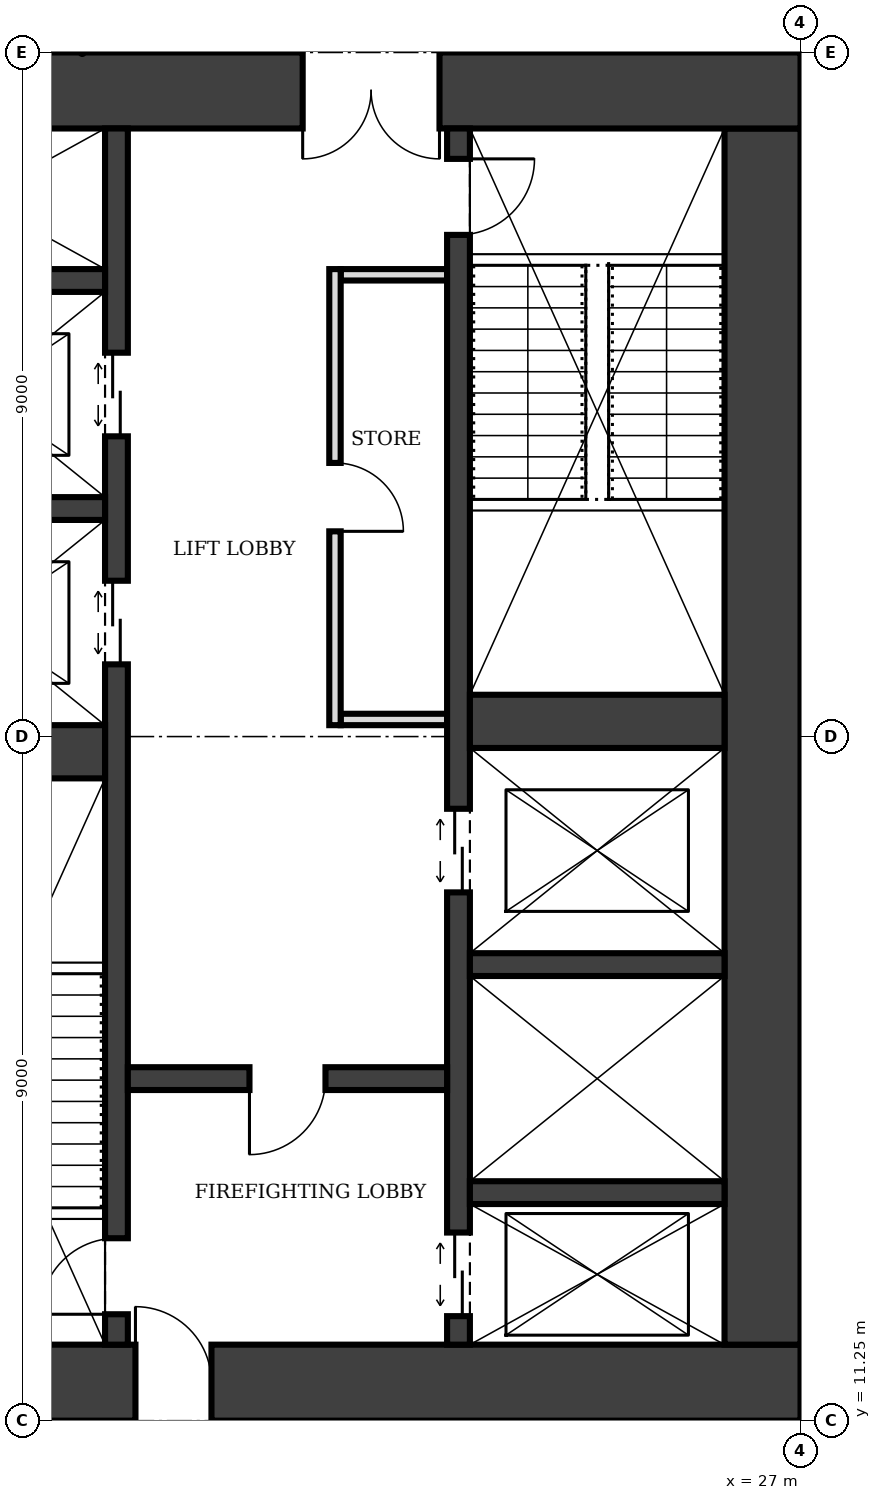
"""IFC4 building model, lengths in metres.
Left out: names, types, materials, properties, quantities, classifications, styles, units other than length and angle.
Written with IfcOpenShell. Run it as: python <this file> out.ifc"""

import sys

from ifc_helpers import new_model, si_unit, direction, frame, frame_2d, origin, place, context, subcontext, project, spatial, rectangle, extrude, element, fill, save


model = new_model("IFC4")
c1 = context("Model", 3, precision=1e-05, world=origin(), true_north=direction((0.0, 1.0)))
c2 = subcontext(c1, "Body", "Model", "MODEL_VIEW")
j1 = project(units=[si_unit("LENGTHUNIT", "METRE"), si_unit("PLANEANGLEUNIT", "RADIAN")], contexts=[c1])
p1 = place(None, origin())
s1 = spatial("IfcSite", under=j1, at=p1, CompositionType="ELEMENT")
p2 = place(p1, origin())
s2 = spatial("IfcBuilding", under=s1, at=p2, CompositionType="ELEMENT")
p3 = place(p2, frame((0.0, 0.0, 25.0)))
s3 = spatial("IfcBuildingStorey", under=s2, at=p3, CompositionType="ELEMENT", Elevation=25.0)
p4 = place(p3, frame((13.5, 11.75, 0.0), z_axis=(0.0, 0.0, 1.0), x_axis=(1.0, 0.0, 0.0)))
e1 = element("IfcWall", 1, at=p4, inside=s3, PredefinedType="SHEAR", context=c2, shape_type="SweptSolid", body=[
    extrude(rectangle(XDim=13.5, YDim=1.0, at=frame_2d((6.75, 0.0))), origin(), (0.0, 0.0, 1.0), 4.0),
])
p5 = place(p4, frame((4.75, 0.0, 0.0)))
e2 = element("IfcOpeningElement", 2, at=p5, cuts=e1, PredefinedType="OPENING", context=c2, shape_type="SweptSolid", body=[
    extrude(rectangle(XDim=1.0, YDim=2.1, at=frame_2d((0.5, 1.05))), frame((0.0, 0.51, 0.0), z_axis=(0.0, -1.0, 0.0), x_axis=(1.0, 0.0, 0.0)), (0.0, 0.0, 1.0), 1.02),
])
p6 = place(p3, frame((26.5, 12.25, 0.0), z_axis=(0.0, 0.0, 1.0), x_axis=(0.0, 1.0, 0.0)))
e3 = element("IfcWall", 3, at=p6, inside=s3, PredefinedType="SHEAR", context=c2, shape_type="SweptSolid", body=[
    extrude(rectangle(XDim=16.0, YDim=1.0, at=frame_2d((8.0, 0.0))), origin(), (0.0, 0.0, 1.0), 4.0),
])
p7 = place(p3, frame((27.0, 28.75, 0.0), z_axis=(0.0, 0.0, 1.0), x_axis=(-1.0, 0.0, 0.0)))
e4 = element("IfcWall", 4, at=p7, inside=s3, PredefinedType="SHEAR", context=c2, shape_type="SweptSolid", body=[
    extrude(rectangle(XDim=13.5, YDim=1.0, at=frame_2d((6.75, 0.0))), origin(), (0.0, 0.0, 1.0), 4.0),
])
p8 = place(p7, frame((4.75, 0.0, 0.0)))
e5 = element("IfcOpeningElement", 5, at=p8, cuts=e4, PredefinedType="OPENING", context=c2, shape_type="SweptSolid", body=[
    extrude(rectangle(XDim=1.8, YDim=2.1, at=frame_2d((0.9, 1.05))), frame((0.0, 0.51, 0.0), z_axis=(0.0, -1.0, 0.0), x_axis=(1.0, 0.0, 0.0)), (0.0, 0.0, 1.0), 1.02),
])
p9 = place(p3, frame((18.0, 12.25, 0.0), z_axis=(0.0, 0.0, 1.0), x_axis=(0.0, 1.0, 0.0)))
e6 = element("IfcWall", 6, at=p9, inside=s3, PredefinedType="SHEAR", context=c2, shape_type="SweptSolid", body=[
    extrude(rectangle(XDim=16.0, YDim=0.3, at=frame_2d((8.0, 0.0))), origin(), (0.0, 0.0, 1.0), 4.0),
])
p10 = place(p9, frame((0.4, 0.0, 0.0)))
e7 = element("IfcOpeningElement", 7, at=p10, cuts=e6, PredefinedType="OPENING", context=c2, shape_type="SweptSolid", body=[
    extrude(rectangle(XDim=1.0, YDim=2.1, at=frame_2d((0.5, 1.05))), frame((0.0, 0.16, 0.0), z_axis=(0.0, -1.0, 0.0), x_axis=(1.0, 0.0, 0.0)), (0.0, 0.0, 1.0), 0.32),
])
p11 = place(p9, frame((8.95, 0.0, 0.0)))
e8 = element("IfcOpeningElement", 8, at=p11, cuts=e6, PredefinedType="OPENING", context=c2, shape_type="SweptSolid", body=[
    extrude(rectangle(XDim=1.1, YDim=2.1, at=frame_2d((0.55, 1.05))), frame((0.0, 0.16, 0.0), z_axis=(0.0, -1.0, 0.0), x_axis=(1.0, 0.0, 0.0)), (0.0, 0.0, 1.0), 0.32),
])
p12 = place(p9, frame((11.95, 0.0, 0.0)))
e9 = element("IfcOpeningElement", 9, at=p12, cuts=e6, PredefinedType="OPENING", context=c2, shape_type="SweptSolid", body=[
    extrude(rectangle(XDim=1.1, YDim=2.1, at=frame_2d((0.55, 1.05))), frame((0.0, 0.16, 0.0), z_axis=(0.0, -1.0, 0.0), x_axis=(1.0, 0.0, 0.0)), (0.0, 0.0, 1.0), 0.32),
])
p13 = place(p3, frame((22.5, 12.25, 0.0), z_axis=(0.0, 0.0, 1.0), x_axis=(0.0, 1.0, 0.0)))
e10 = element("IfcWall", 10, at=p13, inside=s3, PredefinedType="SHEAR", context=c2, shape_type="SweptSolid", body=[
    extrude(rectangle(XDim=16.0, YDim=0.3, at=frame_2d((8.0, 0.0))), origin(), (0.0, 0.0, 1.0), 4.0),
])
p14 = place(p13, frame((14.6, 0.0, 0.0)))
e11 = element("IfcOpeningElement", 11, at=p14, cuts=e10, PredefinedType="OPENING", context=c2, shape_type="SweptSolid", body=[
    extrude(rectangle(XDim=1.0, YDim=2.1, at=frame_2d((0.5, 1.05))), frame((0.0, 0.16, 0.0), z_axis=(0.0, -1.0, 0.0), x_axis=(1.0, 0.0, 0.0)), (0.0, 0.0, 1.0), 0.32),
])
p15 = place(p13, frame((0.375, 0.0, 0.0)))
e12 = element("IfcOpeningElement", 12, at=p15, cuts=e10, PredefinedType="OPENING", context=c2, shape_type="SweptSolid", body=[
    extrude(rectangle(XDim=1.1, YDim=2.1, at=frame_2d((0.55, 1.05))), frame((0.0, 0.16, 0.0), z_axis=(0.0, -1.0, 0.0), x_axis=(1.0, 0.0, 0.0)), (0.0, 0.0, 1.0), 0.32),
])
p16 = place(p13, frame((5.95, 0.0, 0.0)))
e13 = element("IfcOpeningElement", 13, at=p16, cuts=e10, PredefinedType="OPENING", context=c2, shape_type="SweptSolid", body=[
    extrude(rectangle(XDim=1.1, YDim=2.1, at=frame_2d((0.55, 1.05))), frame((0.0, 0.16, 0.0), z_axis=(0.0, -1.0, 0.0), x_axis=(1.0, 0.0, 0.0)), (0.0, 0.0, 1.0), 0.32),
])
p17 = place(p3, frame((14.5, 20.05, 0.0), z_axis=(0.0, 0.0, 1.0), x_axis=(1.0, 0.0, 0.0)))
e14 = element("IfcWall", 14, at=p17, inside=s3, PredefinedType="SHEAR", context=c2, shape_type="SweptSolid", body=[
    extrude(rectangle(XDim=3.35, YDim=0.7, at=frame_2d((1.675, 0.0))), origin(), (0.0, 0.0, 1.0), 4.0),
])
p18 = place(p3, frame((18.15, 15.75, 0.0), z_axis=(0.0, 0.0, 1.0), x_axis=(1.0, 0.0, 0.0)))
e15 = element("IfcWall", 15, at=p18, inside=s3, PredefinedType="SHEAR", context=c2, shape_type="SweptSolid", body=[
    extrude(rectangle(XDim=4.2, YDim=0.3, at=frame_2d((2.1, 0.0))), origin(), (0.0, 0.0, 1.0), 4.0),
])
p19 = place(p18, frame((1.6, 0.0, 0.0)))
e16 = element("IfcOpeningElement", 16, at=p19, cuts=e15, PredefinedType="OPENING", context=c2, shape_type="SweptSolid", body=[
    extrude(rectangle(XDim=1.0, YDim=2.1, at=frame_2d((0.5, 1.05))), frame((0.0, 0.16, 0.0), z_axis=(0.0, -1.0, 0.0), x_axis=(1.0, 0.0, 0.0)), (0.0, 0.0, 1.0), 0.32),
])
for number, where, z_axis, x_axis in (
    (17, (22.65, 14.25, 0.0), (0.0, 0.0, 1.0), (1.0, 0.0, 0.0)),
    (18, (22.65, 17.25, 0.0), (0.0, 0.0, 1.0), (1.0, 0.0, 0.0)),
):
    element("IfcWall", number, at=place(p3, frame(where, z_axis=z_axis, x_axis=x_axis)), inside=s3, PredefinedType="SHEAR", context=c2, shape_type="SweptSolid", body=[
        extrude(rectangle(XDim=3.35, YDim=0.3, at=frame_2d((1.675, 0.0))), origin(), (0.0, 0.0, 1.0), 4.0),
    ])
p20 = place(p3, frame((22.65, 20.45, 0.0), z_axis=(0.0, 0.0, 1.0), x_axis=(1.0, 0.0, 0.0)))
e19 = element("IfcWall", 19, at=p20, inside=s3, PredefinedType="SHEAR", context=c2, shape_type="SweptSolid", body=[
    extrude(rectangle(XDim=3.35, YDim=0.7, at=frame_2d((1.675, 0.0))), origin(), (0.0, 0.0, 1.0), 4.0),
])
for number, where, z_axis, x_axis in (
    (20, (14.5, 23.25, 0.0), (0.0, 0.0, 1.0), (1.0, 0.0, 0.0)),
    (21, (14.5, 26.25, 0.0), (0.0, 0.0, 1.0), (1.0, 0.0, 0.0)),
):
    element("IfcWall", number, at=place(p3, frame(where, z_axis=z_axis, x_axis=x_axis)), inside=s3, PredefinedType="SHEAR", context=c2, shape_type="SweptSolid", body=[
        extrude(rectangle(XDim=3.35, YDim=0.3, at=frame_2d((1.675, 0.0))), origin(), (0.0, 0.0, 1.0), 4.0),
    ])
p21 = place(p3, frame((20.875, 20.4, 0.0), z_axis=(0.0, 0.0, 1.0), x_axis=(0.0, 1.0, 0.0)))
e22 = element("IfcWall", 22, at=p21, inside=s3, PredefinedType="PARTITIONING", context=c2, shape_type="SweptSolid", body=[
    extrude(rectangle(XDim=6.0, YDim=0.15, at=frame_2d((3.0, 0.0))), origin(), (0.0, 0.0, 1.0), 3.75),
])
p22 = place(p21, frame((2.55, 0.0, 0.0)))
e23 = element("IfcOpeningElement", 23, at=p22, cuts=e22, PredefinedType="OPENING", context=c2, shape_type="SweptSolid", body=[
    extrude(rectangle(XDim=0.9, YDim=2.1, at=frame_2d((0.45, 1.05))), frame((0.0, 0.085, 0.0), z_axis=(0.0, -1.0, 0.0), x_axis=(1.0, 0.0, 0.0)), (0.0, 0.0, 1.0), 0.17),
])
for number, where, z_axis, x_axis in (
    (24, (20.95, 20.475, 0.0), (0.0, 0.0, 1.0), (1.0, 0.0, 0.0)),
    (25, (20.95, 26.325, 0.0), (0.0, 0.0, 1.0), (1.0, 0.0, 0.0)),
):
    element("IfcWall", number, at=place(p3, frame(where, z_axis=z_axis, x_axis=x_axis)), inside=s3, PredefinedType="PARTITIONING", context=c2, shape_type="SweptSolid", body=[
        extrude(rectangle(XDim=1.4, YDim=0.15, at=frame_2d((0.7, 0.0))), origin(), (0.0, 0.0, 1.0), 3.75),
    ])
p23 = place(p5, origin())
e26 = element("IfcDoor", 26, at=p23, inside=s3, OperationType="SINGLE_SWING_LEFT", PredefinedType="DOOR", context=c2, shape_type="SweptSolid", body=[
    extrude(rectangle(XDim=1.0, YDim=2.1, at=frame_2d((0.5, 1.05))), frame((0.0, 0.025, 0.0), z_axis=(0.0, -1.0, 0.0), x_axis=(1.0, 0.0, 0.0)), (0.0, 0.0, 1.0), 0.05),
])
fill(e2, e26)
p24 = place(p8, origin())
e27 = element("IfcDoor", 27, at=p24, inside=s3, OperationType="DOUBLE_DOOR_SINGLE_SWING", PredefinedType="DOOR", context=c2, shape_type="SweptSolid", body=[
    extrude(rectangle(XDim=1.8, YDim=2.1, at=frame_2d((0.9, 1.05))), frame((0.0, 0.025, 0.0), z_axis=(0.0, -1.0, 0.0), x_axis=(1.0, 0.0, 0.0)), (0.0, 0.0, 1.0), 0.05),
])
fill(e5, e27)
p25 = place(p19, frame((1.0, 0.0, 0.0), z_axis=(0.0, 0.0, 1.0), x_axis=(-1.0, 0.0, 0.0)))
e28 = element("IfcDoor", 28, at=p25, inside=s3, OperationType="SINGLE_SWING_RIGHT", PredefinedType="DOOR", context=c2, shape_type="SweptSolid", body=[
    extrude(rectangle(XDim=1.0, YDim=2.1, at=frame_2d((0.5, 1.05))), frame((0.0, 0.025, 0.0), z_axis=(0.0, -1.0, 0.0), x_axis=(1.0, 0.0, 0.0)), (0.0, 0.0, 1.0), 0.05),
])
fill(e16, e28)
p26 = place(p10, origin())
e29 = element("IfcDoor", 29, at=p26, inside=s3, OperationType="SINGLE_SWING_LEFT", PredefinedType="DOOR", context=c2, shape_type="SweptSolid", body=[
    extrude(rectangle(XDim=1.0, YDim=2.1, at=frame_2d((0.5, 1.05))), frame((0.0, 0.025, 0.0), z_axis=(0.0, -1.0, 0.0), x_axis=(1.0, 0.0, 0.0)), (0.0, 0.0, 1.0), 0.05),
])
fill(e7, e29)
p27 = place(p14, frame((1.0, 0.0, 0.0), z_axis=(0.0, 0.0, 1.0), x_axis=(-1.0, 0.0, 0.0)))
e30 = element("IfcDoor", 30, at=p27, inside=s3, OperationType="SINGLE_SWING_LEFT", PredefinedType="DOOR", context=c2, shape_type="SweptSolid", body=[
    extrude(rectangle(XDim=1.0, YDim=2.1, at=frame_2d((0.5, 1.05))), frame((0.0, 0.025, 0.0), z_axis=(0.0, -1.0, 0.0), x_axis=(1.0, 0.0, 0.0)), (0.0, 0.0, 1.0), 0.05),
])
fill(e11, e30)
p28 = place(p15, origin())
e31 = element("IfcDoor", 31, at=p28, inside=s3, OperationType="DOUBLE_DOOR_SLIDING", PredefinedType="DOOR", context=c2, shape_type="SweptSolid", body=[
    extrude(rectangle(XDim=1.1, YDim=2.1, at=frame_2d((0.55, 1.05))), frame((0.0, 0.025, 0.0), z_axis=(0.0, -1.0, 0.0), x_axis=(1.0, 0.0, 0.0)), (0.0, 0.0, 1.0), 0.05),
])
fill(e12, e31)
p29 = place(p11, origin())
e32 = element("IfcDoor", 32, at=p29, inside=s3, OperationType="DOUBLE_DOOR_SLIDING", PredefinedType="DOOR", context=c2, shape_type="SweptSolid", body=[
    extrude(rectangle(XDim=1.1, YDim=2.1, at=frame_2d((0.55, 1.05))), frame((0.0, 0.025, 0.0), z_axis=(0.0, -1.0, 0.0), x_axis=(1.0, 0.0, 0.0)), (0.0, 0.0, 1.0), 0.05),
])
fill(e8, e32)
p30 = place(p12, origin())
e33 = element("IfcDoor", 33, at=p30, inside=s3, OperationType="DOUBLE_DOOR_SLIDING", PredefinedType="DOOR", context=c2, shape_type="SweptSolid", body=[
    extrude(rectangle(XDim=1.1, YDim=2.1, at=frame_2d((0.55, 1.05))), frame((0.0, 0.025, 0.0), z_axis=(0.0, -1.0, 0.0), x_axis=(1.0, 0.0, 0.0)), (0.0, 0.0, 1.0), 0.05),
])
fill(e9, e33)
p31 = place(p16, origin())
e34 = element("IfcDoor", 34, at=p31, inside=s3, OperationType="DOUBLE_DOOR_SLIDING", PredefinedType="DOOR", context=c2, shape_type="SweptSolid", body=[
    extrude(rectangle(XDim=1.1, YDim=2.1, at=frame_2d((0.55, 1.05))), frame((0.0, 0.025, 0.0), z_axis=(0.0, -1.0, 0.0), x_axis=(1.0, 0.0, 0.0)), (0.0, 0.0, 1.0), 0.05),
])
fill(e13, e34)
p32 = place(p22, frame((0.9, 0.0, 0.0), z_axis=(0.0, 0.0, 1.0), x_axis=(-1.0, 0.0, 0.0)))
e35 = element("IfcDoor", 35, at=p32, inside=s3, OperationType="SINGLE_SWING_RIGHT", PredefinedType="DOOR", context=c2, shape_type="SweptSolid", body=[
    extrude(rectangle(XDim=0.9, YDim=2.1, at=frame_2d((0.45, 1.05))), frame((0.0, 0.025, 0.0), z_axis=(0.0, -1.0, 0.0), x_axis=(1.0, 0.0, 0.0)), (0.0, 0.0, 1.0), 0.05),
])
fill(e23, e35)
save(model, sys.argv[1])
